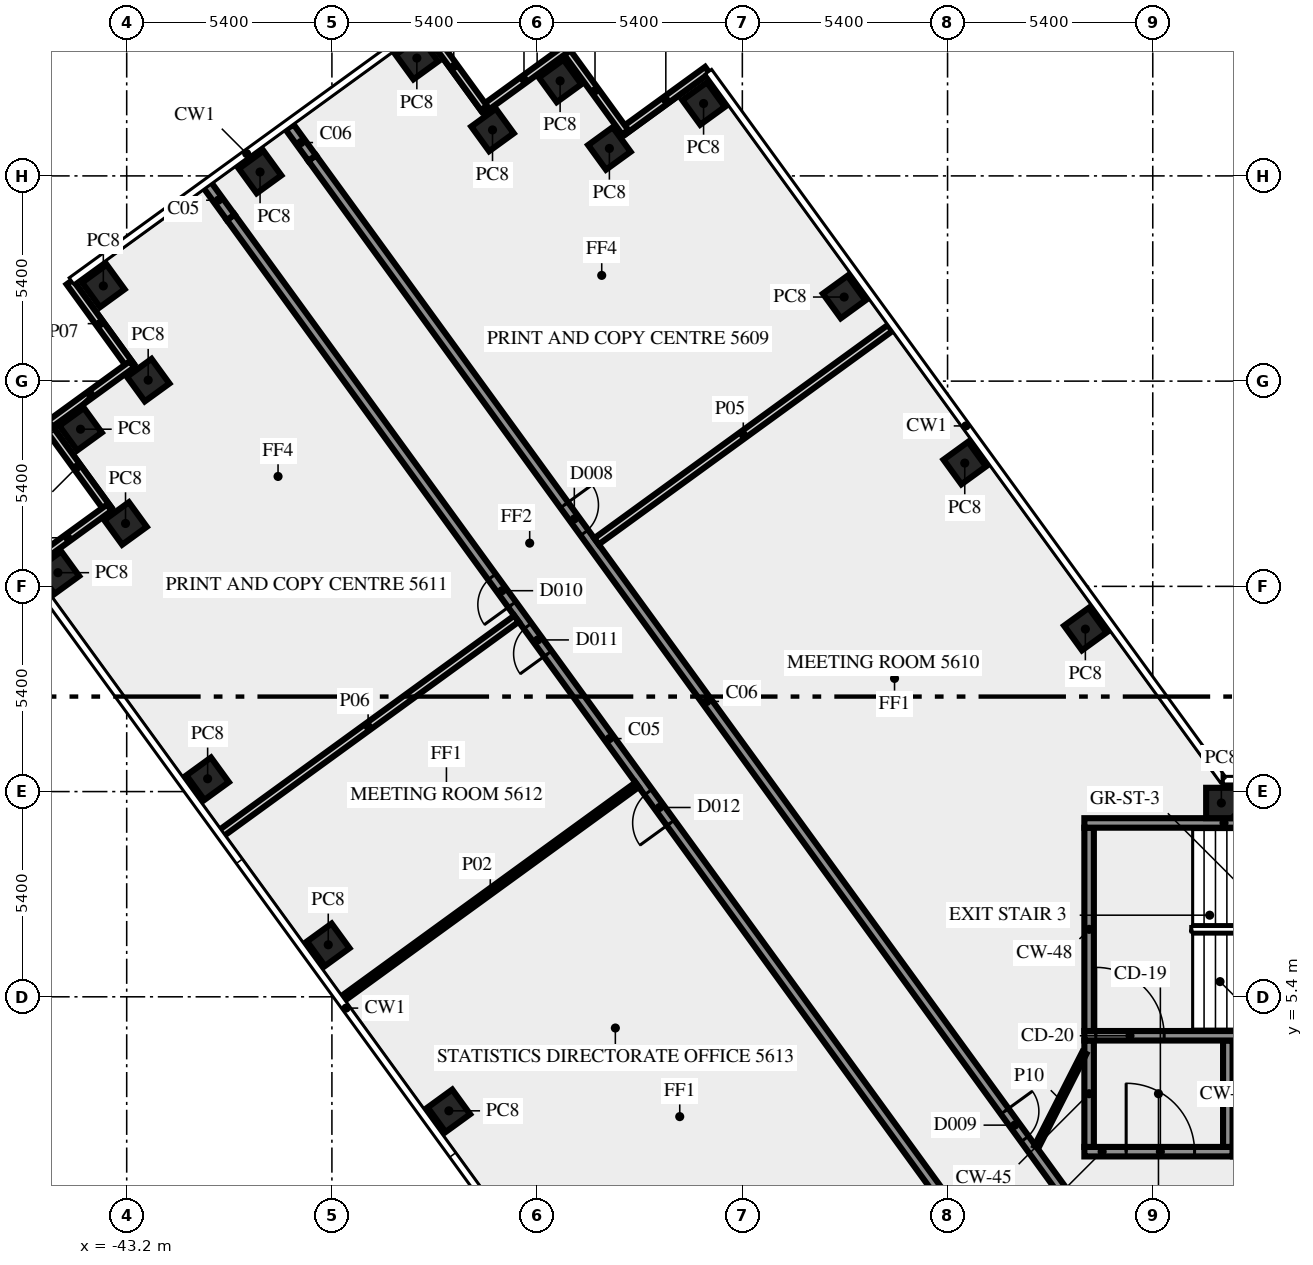
"""IFC4 building model, lengths in metres.
Left out: names, types, materials, properties, quantities, classifications, styles, units other than length and angle.
Written with IfcOpenShell. Run it as: python <this file> out.ifc"""

import sys

from ifc_helpers import new_model, si_unit, direction, frame, frame_2d, origin, origin_2d, place, context, subcontext, project, spatial, rectangle, extrude, element, fill, save


model = new_model("IFC4")
c1 = context("Model", 3, precision=1e-05, world=origin(), true_north=direction((0.0, 1.0)))
c2 = subcontext(c1, "Body", "Model", "MODEL_VIEW")
j1 = project(units=[si_unit("LENGTHUNIT", "METRE"), si_unit("PLANEANGLEUNIT", "RADIAN")], contexts=[c1])
p1 = place(None, origin())
s1 = spatial("IfcSite", under=j1, at=p1, CompositionType="ELEMENT")
p2 = place(p1, origin())
s2 = spatial("IfcBuilding", under=s1, at=p2, CompositionType="ELEMENT")
p3 = place(p2, frame((0.0, 0.0, 238.0)))
s3 = spatial("IfcBuildingStorey", under=s2, at=p3, CompositionType="ELEMENT", Elevation=238.0)
for number, where, z_axis, x_axis in (
    (1, (-17.974, 15.075, 0.0), (0.0, 0.0, 1.0), (-0.588, 0.809, 0.0)),
    (2, (-21.147, 19.444, 0.0), (0.0, 0.0, 1.0), (-0.588, 0.809, 0.0)),
    (3, (-24.321, 23.812, 0.0), (0.0, 0.0, 1.0), (-0.588, 0.809, 0.0)),
    (4, (-28.02, 28.905, 0.0), (0.0, 0.0, 1.0), (-0.809, -0.588, 0.0)),
    (5, (-30.499, 27.723, 0.0), (0.0, 0.0, 1.0), (-0.809, -0.588, 0.0)),
    (6, (-31.795, 29.5, 0.0), (0.0, 0.0, 1.0), (-0.588, 0.809, 0.0)),
    (7, (-33.574, 28.209, 0.0), (0.0, 0.0, 1.0), (-0.588, 0.809, 0.0)),
    (8, (-35.565, 30.1, 0.0), (0.0, 0.0, 1.0), (-0.809, -0.588, 0.0)),
    (9, (-39.691, 27.102, 0.0), (0.0, 0.0, 1.0), (-0.809, -0.588, 0.0)),
    (10, (-43.815, 24.105, 0.0), (0.0, 0.0, 1.0), (-0.809, -0.588, 0.0)),
    (11, (-42.635, 21.626, 0.0), (0.0, 0.0, 1.0), (-0.809, -0.588, 0.0)),
    (12, (-44.415, 20.335, 0.0), (0.0, 0.0, 1.0), (0.588, -0.809, 0.0)),
    (13, (-43.231, 17.854, 0.0), (0.0, 0.0, 1.0), (0.588, -0.809, 0.0)),
    (14, (-45.01, 16.56, 0.0), (0.0, 0.0, 1.0), (0.588, -0.809, 0.0)),
    (15, (-41.07, 11.137, 0.0), (0.0, 0.0, 1.0), (0.588, -0.809, 0.0)),
    (16, (-37.896, 6.769, 0.0), (0.0, 0.0, 1.0), (0.588, -0.809, 0.0)),
    (17, (-34.722, 2.4, 0.0), (0.0, 0.0, 1.0), (0.588, -0.809, 0.0)),
    (18, (-14.395, 10.5, 0.0), (0.0, 0.0, 1.0), (-1.0, 0.0, 0.0)),
):
    element("IfcColumn", number, at=place(p3, frame(where, z_axis=z_axis, x_axis=x_axis)), inside=s3, PredefinedType="COLUMN", context=c2, shape_type="SweptSolid", body=[
        extrude(rectangle(XDim=0.8, YDim=0.8, at=origin_2d()), origin(), (0.0, 0.0, 1.0), 3.4),
    ])
for number, where, z_axis, x_axis in (
    (19, (-27.921, 29.787, 0.0), (0.0, 0.0, 1.0), (-0.809, -0.588, 0.0)),
    (20, (-30.083, 28.149, 0.0), (0.0, 0.0, 1.0), (-0.588, 0.809, 0.0)),
    (21, (-31.654, 30.331, 0.0), (0.0, 0.0, 1.0), (-0.809, -0.588, 0.0)),
    (22, (-33.801, 28.786, 0.0), (0.0, 0.0, 1.0), (-0.588, 0.809, 0.0)),
    (23, (-44.699, 24.205, 0.0), (0.0, 0.0, 1.0), (0.588, -0.809, 0.0)),
    (24, (-43.061, 22.043, 0.0), (0.0, 0.0, 1.0), (-0.809, -0.588, 0.0)),
    (25, (-45.296, 20.434, 0.0), (0.0, 0.0, 1.0), (0.588, -0.809, 0.0)),
    (26, (-43.658, 18.272, 0.0), (0.0, 0.0, 1.0), (-0.809, -0.588, 0.0)),
):
    element("IfcWall", number, at=place(p3, frame(where, z_axis=z_axis, x_axis=x_axis)), inside=s3, PredefinedType="SOLIDWALL", context=c2, shape_type="SweptSolid", body=[
        extrude(rectangle(XDim=2.7, YDim=0.2, at=frame_2d((1.35, 0.0))), origin(), (0.0, 0.0, 1.0), 3.4),
    ])
p4 = place(p3, frame((-18.0, 1.325, 0.0), z_axis=(0.0, 0.0, 1.0), x_axis=(1.0, 0.0, 0.0)))
e27 = element("IfcWall", 27, at=p4, inside=s3, PredefinedType="SHEAR", context=c2, shape_type="SweptSolid", body=[
    extrude(rectangle(XDim=3.9, YDim=0.25, at=frame_2d((1.95, 0.0))), origin(), (0.0, 0.0, 1.0), 3.4),
])
p5 = place(p4, frame((1.1, 0.0, 0.0)))
e28 = element("IfcOpeningElement", 28, at=p5, cuts=e27, PredefinedType="OPENING", context=c2, shape_type="SweptSolid", body=[
    extrude(rectangle(XDim=1.8, YDim=2.1, at=frame_2d((0.9, 1.05))), frame((0.0, 0.135, 0.0), z_axis=(0.0, -1.0, 0.0), x_axis=(1.0, 0.0, 0.0)), (0.0, 0.0, 1.0), 0.27),
])
for number, where, z_axis, x_axis in (
    (29, (-17.875, 1.45, 0.0), (0.0, 0.0, 1.0), (0.0, 1.0, 0.0)),
    (30, (-14.225, 1.45, 0.0), (0.0, 0.0, 1.0), (0.0, 1.0, 0.0)),
):
    element("IfcWall", number, at=place(p3, frame(where, z_axis=z_axis, x_axis=x_axis)), inside=s3, PredefinedType="SHEAR", context=c2, shape_type="SweptSolid", body=[
        extrude(rectangle(XDim=2.8, YDim=0.25, at=frame_2d((1.4, 0.0))), origin(), (0.0, 0.0, 1.0), 3.4),
    ])
p6 = place(p3, frame((-18.0, 4.375, 0.0), z_axis=(0.0, 0.0, 1.0), x_axis=(1.0, 0.0, 0.0)))
e31 = element("IfcWall", 31, at=p6, inside=s3, PredefinedType="SHEAR", context=c2, shape_type="SweptSolid", body=[
    extrude(rectangle(XDim=10.5, YDim=0.25, at=frame_2d((5.25, 0.0))), origin(), (0.0, 0.0, 1.0), 3.4),
])
p7 = place(p6, frame((0.3, 0.0, 0.0)))
e32 = element("IfcOpeningElement", 32, at=p7, cuts=e31, PredefinedType="OPENING", context=c2, shape_type="SweptSolid", body=[
    extrude(rectangle(XDim=1.8, YDim=2.1, at=frame_2d((0.9, 1.05))), frame((0.0, 0.135, 0.0), z_axis=(0.0, -1.0, 0.0), x_axis=(1.0, 0.0, 0.0)), (0.0, 0.0, 1.0), 0.27),
])
p8 = place(p3, frame((-17.875, 4.5, 0.0), z_axis=(0.0, 0.0, 1.0), x_axis=(0.0, 1.0, 0.0)))
e33 = element("IfcWall", 33, at=p8, inside=s3, PredefinedType="SHEAR", context=c2, shape_type="SweptSolid", body=[
    extrude(rectangle(XDim=5.35, YDim=0.25, at=frame_2d((2.675, 0.0))), origin(), (0.0, 0.0, 1.0), 3.4),
])
p9 = place(p3, frame((-18.0, 9.975, 0.0), z_axis=(0.0, 0.0, 1.0), x_axis=(1.0, 0.0, 0.0)))
e34 = element("IfcWall", 34, at=p9, inside=s3, PredefinedType="SHEAR", context=c2, shape_type="SweptSolid", body=[
    extrude(rectangle(XDim=10.5, YDim=0.25, at=frame_2d((5.25, 0.0))), origin(), (0.0, 0.0, 1.0), 3.4),
])
p10 = place(p9, frame((4.5, 0.0, 1.0)))
e35 = element("IfcOpeningElement", 35, at=p10, cuts=e34, PredefinedType="OPENING", context=c2, shape_type="SweptSolid", body=[
    extrude(rectangle(XDim=1.2, YDim=1.2, at=frame_2d((0.6, 0.6))), frame((0.0, 0.135, 0.0), z_axis=(0.0, -1.0, 0.0), x_axis=(1.0, 0.0, 0.0)), (0.0, 0.0, 1.0), 0.27),
])
p11 = place(p3, frame((-20.531, -1.523, 0.0), z_axis=(0.0, 0.0, 1.0), x_axis=(-0.587781654618, 0.809019608226, 0.0)))
e36 = element("IfcWall", 36, at=p11, inside=s3, PredefinedType="SOLIDWALL", context=c2, shape_type="SweptSolid", body=[
    extrude(rectangle(XDim=33.911, YDim=0.25, at=frame_2d((16.956, 0.0))), origin(), (0.0, 0.0, 1.0), 3.4),
])
p12 = place(p11, frame((14.216, 0.0, 0.0)))
e37 = element("IfcOpeningElement", 37, at=p12, cuts=e36, PredefinedType="OPENING", context=c2, shape_type="SweptSolid", body=[
    extrude(rectangle(XDim=1.0, YDim=2.1, at=frame_2d((0.5, 1.05))), frame((0.0, 0.135, 0.0), z_axis=(0.0, -1.0, 0.0), x_axis=(1.0, 0.0, 0.0)), (0.0, 0.0, 1.0), 0.27),
])
p13 = place(p11, frame((19.715, 0.0, 0.0)))
e38 = element("IfcOpeningElement", 38, at=p13, cuts=e36, PredefinedType="OPENING", context=c2, shape_type="SweptSolid", body=[
    extrude(rectangle(XDim=0.9, YDim=2.1, at=frame_2d((0.45, 1.05))), frame((0.0, 0.135, 0.0), z_axis=(0.0, -1.0, 0.0), x_axis=(1.0, 0.0, 0.0)), (0.0, 0.0, 1.0), 0.27),
])
p14 = place(p11, frame((21.316, 0.0, 0.0)))
e39 = element("IfcOpeningElement", 39, at=p14, cuts=e36, PredefinedType="OPENING", context=c2, shape_type="SweptSolid", body=[
    extrude(rectangle(XDim=0.9, YDim=2.1, at=frame_2d((0.45, 1.05))), frame((0.0, 0.135, 0.0), z_axis=(0.0, -1.0, 0.0), x_axis=(1.0, 0.0, 0.0)), (0.0, 0.0, 1.0), 0.27),
])
p15 = place(p3, frame((-38.32, 27.469, 0.0), z_axis=(0.0, 0.0, 1.0), x_axis=(0.587788021768, -0.809014982226, 0.0)))
e40 = element("IfcWall", 40, at=p15, inside=s3, PredefinedType="SOLIDWALL", context=c2, shape_type="SweptSolid", body=[
    extrude(rectangle(XDim=35.344, YDim=0.25, at=frame_2d((17.672, 0.0))), origin(), (0.0, 0.0, 1.0), 3.4),
])
p16 = place(p15, frame((31.003, 0.0, 0.0)))
e41 = element("IfcOpeningElement", 41, at=p16, cuts=e40, PredefinedType="OPENING", context=c2, shape_type="SweptSolid", body=[
    extrude(rectangle(XDim=0.9, YDim=2.1, at=frame_2d((0.45, 1.05))), frame((0.0, 0.135, 0.0), z_axis=(0.0, -1.0, 0.0), x_axis=(1.0, 0.0, 0.0)), (0.0, 0.0, 1.0), 0.27),
])
p17 = place(p15, frame((11.286, 0.0, 0.0)))
e42 = element("IfcOpeningElement", 42, at=p17, cuts=e40, PredefinedType="OPENING", context=c2, shape_type="SweptSolid", body=[
    extrude(rectangle(XDim=0.9, YDim=2.1, at=frame_2d((0.45, 1.05))), frame((0.0, 0.135, 0.0), z_axis=(0.0, -1.0, 0.0), x_axis=(1.0, 0.0, 0.0)), (0.0, 0.0, 1.0), 0.27),
])
p18 = place(p3, frame((-29.769, 10.98, 0.0), z_axis=(0.0, 0.0, 1.0), x_axis=(-0.809048817734, -0.587741448702, 0.0)))
e43 = element("IfcWall", 43, at=p18, inside=s3, PredefinedType="PARTITIONING", context=c2, shape_type="SweptSolid", body=[
    extrude(rectangle(XDim=9.55, YDim=0.15, at=frame_2d((4.775, 0.0))), origin(), (0.0, 0.0, 1.0), 2.6),
])
p19 = place(p3, frame((-23.112, 22.998, 0.0), z_axis=(0.0, 0.0, 1.0), x_axis=(-0.809043311713, -0.587749027879, 0.0)))
e44 = element("IfcWall", 44, at=p19, inside=s3, PredefinedType="SOLIDWALL", context=c2, shape_type="SweptSolid", body=[
    extrude(rectangle(XDim=9.55, YDim=0.2, at=frame_2d((4.775, 0.0))), origin(), (0.0, 0.0, 1.0), 2.6),
])
p20 = place(p3, frame((-32.943, 15.349, 0.0), z_axis=(0.0, 0.0, 1.0), x_axis=(-0.80903787798, -0.587756507402, 0.0)))
e45 = element("IfcWall", 45, at=p20, inside=s3, PredefinedType="SOLIDWALL", context=c2, shape_type="SweptSolid", body=[
    extrude(rectangle(XDim=9.652, YDim=0.2, at=frame_2d((4.826, 0.0))), origin(), (0.0, 0.0, 1.0), 2.6),
])
p21 = place(p3, frame((-19.261, 1.45, 0.0), z_axis=(0.0, 0.0, 1.0), x_axis=(0.453950796792, 0.891026752736, 0.0)))
e46 = element("IfcWall", 46, at=p21, inside=s3, PredefinedType="PARTITIONING", context=c2, shape_type="SweptSolid", body=[
    extrude(rectangle(XDim=2.778, YDim=0.12, at=frame_2d((1.389, 0.0))), origin(), (0.0, 0.0, 1.0), 3.4),
])
p22 = place(p3, frame((-40.463, 25.911, 0.0), z_axis=(0.0, 0.0, 1.0), x_axis=(-0.587792454268, 0.809011761785, 0.0)))
e47 = element("IfcWall", 47, at=p22, inside=s3, PredefinedType="SOLIDWALL", context=c2, shape_type="SweptSolid", body=[
    extrude(rectangle(XDim=1.11, YDim=0.25, at=frame_2d((0.555, 0.0))), origin(), (0.0, 0.0, 1.0), 2.6),
])
p23 = place(p3, frame((-38.32, 27.469, 0.0), z_axis=(0.0, 0.0, 1.0), x_axis=(-0.587811913486, 0.808997623213, 0.0)))
e48 = element("IfcWall", 48, at=p23, inside=s3, PredefinedType="SOLIDWALL", context=c2, shape_type="SweptSolid", body=[
    extrude(rectangle(XDim=1.009, YDim=0.25, at=frame_2d((0.504, 0.0))), origin(), (0.0, 0.0, 1.0), 2.6),
])
p24 = place(p5, origin())
e49 = element("IfcDoor", 49, at=p24, inside=s3, OperationType="DOUBLE_DOOR_SINGLE_SWING", PredefinedType="DOOR", context=c2, shape_type="SweptSolid", body=[
    extrude(rectangle(XDim=1.8, YDim=2.1, at=frame_2d((0.9, 1.05))), frame((0.0, 0.025, 0.0), z_axis=(0.0, -1.0, 0.0), x_axis=(1.0, 0.0, 0.0)), (0.0, 0.0, 1.0), 0.05),
])
fill(e28, e49)
p25 = place(p7, origin())
e50 = element("IfcDoor", 50, at=p25, inside=s3, OperationType="DOUBLE_DOOR_SINGLE_SWING", PredefinedType="DOOR", context=c2, shape_type="SweptSolid", body=[
    extrude(rectangle(XDim=1.8, YDim=2.1, at=frame_2d((0.9, 1.05))), frame((0.0, 0.025, 0.0), z_axis=(0.0, -1.0, 0.0), x_axis=(1.0, 0.0, 0.0)), (0.0, 0.0, 1.0), 0.05),
])
fill(e32, e50)
p26 = place(p12, origin())
e51 = element("IfcDoor", 51, at=p26, inside=s3, OperationType="SINGLE_SWING_RIGHT", PredefinedType="DOOR", context=c2, shape_type="SweptSolid", body=[
    extrude(rectangle(XDim=1.0, YDim=2.1, at=frame_2d((0.5, 1.05))), frame((0.0, 0.025, 0.0), z_axis=(0.0, -1.0, 0.0), x_axis=(1.0, 0.0, 0.0)), (0.0, 0.0, 1.0), 0.05),
])
fill(e37, e51)
p27 = place(p16, origin())
e52 = element("IfcDoor", 52, at=p27, inside=s3, OperationType="SINGLE_SWING_RIGHT", PredefinedType="DOOR", context=c2, shape_type="SweptSolid", body=[
    extrude(rectangle(XDim=0.9, YDim=2.1, at=frame_2d((0.45, 1.05))), frame((0.0, 0.025, 0.0), z_axis=(0.0, -1.0, 0.0), x_axis=(1.0, 0.0, 0.0)), (0.0, 0.0, 1.0), 0.05),
])
fill(e41, e52)
p28 = place(p13, origin())
e53 = element("IfcDoor", 53, at=p28, inside=s3, OperationType="SINGLE_SWING_RIGHT", PredefinedType="DOOR", context=c2, shape_type="SweptSolid", body=[
    extrude(rectangle(XDim=0.9, YDim=2.1, at=frame_2d((0.45, 1.05))), frame((0.0, 0.025, 0.0), z_axis=(0.0, -1.0, 0.0), x_axis=(1.0, 0.0, 0.0)), (0.0, 0.0, 1.0), 0.05),
])
fill(e38, e53)
p29 = place(p17, origin())
e54 = element("IfcDoor", 54, at=p29, inside=s3, OperationType="SINGLE_SWING_RIGHT", PredefinedType="DOOR", context=c2, shape_type="SweptSolid", body=[
    extrude(rectangle(XDim=0.9, YDim=2.1, at=frame_2d((0.45, 1.05))), frame((0.0, 0.025, 0.0), z_axis=(0.0, -1.0, 0.0), x_axis=(1.0, 0.0, 0.0)), (0.0, 0.0, 1.0), 0.05),
])
fill(e42, e54)
p30 = place(p14, origin())
e55 = element("IfcDoor", 55, at=p30, inside=s3, OperationType="SINGLE_SWING_LEFT", PredefinedType="DOOR", context=c2, shape_type="SweptSolid", body=[
    extrude(rectangle(XDim=0.9, YDim=2.1, at=frame_2d((0.45, 1.05))), frame((0.0, 0.025, 0.0), z_axis=(0.0, -1.0, 0.0), x_axis=(1.0, 0.0, 0.0)), (0.0, 0.0, 1.0), 0.05),
])
fill(e39, e55)
save(model, sys.argv[1])
